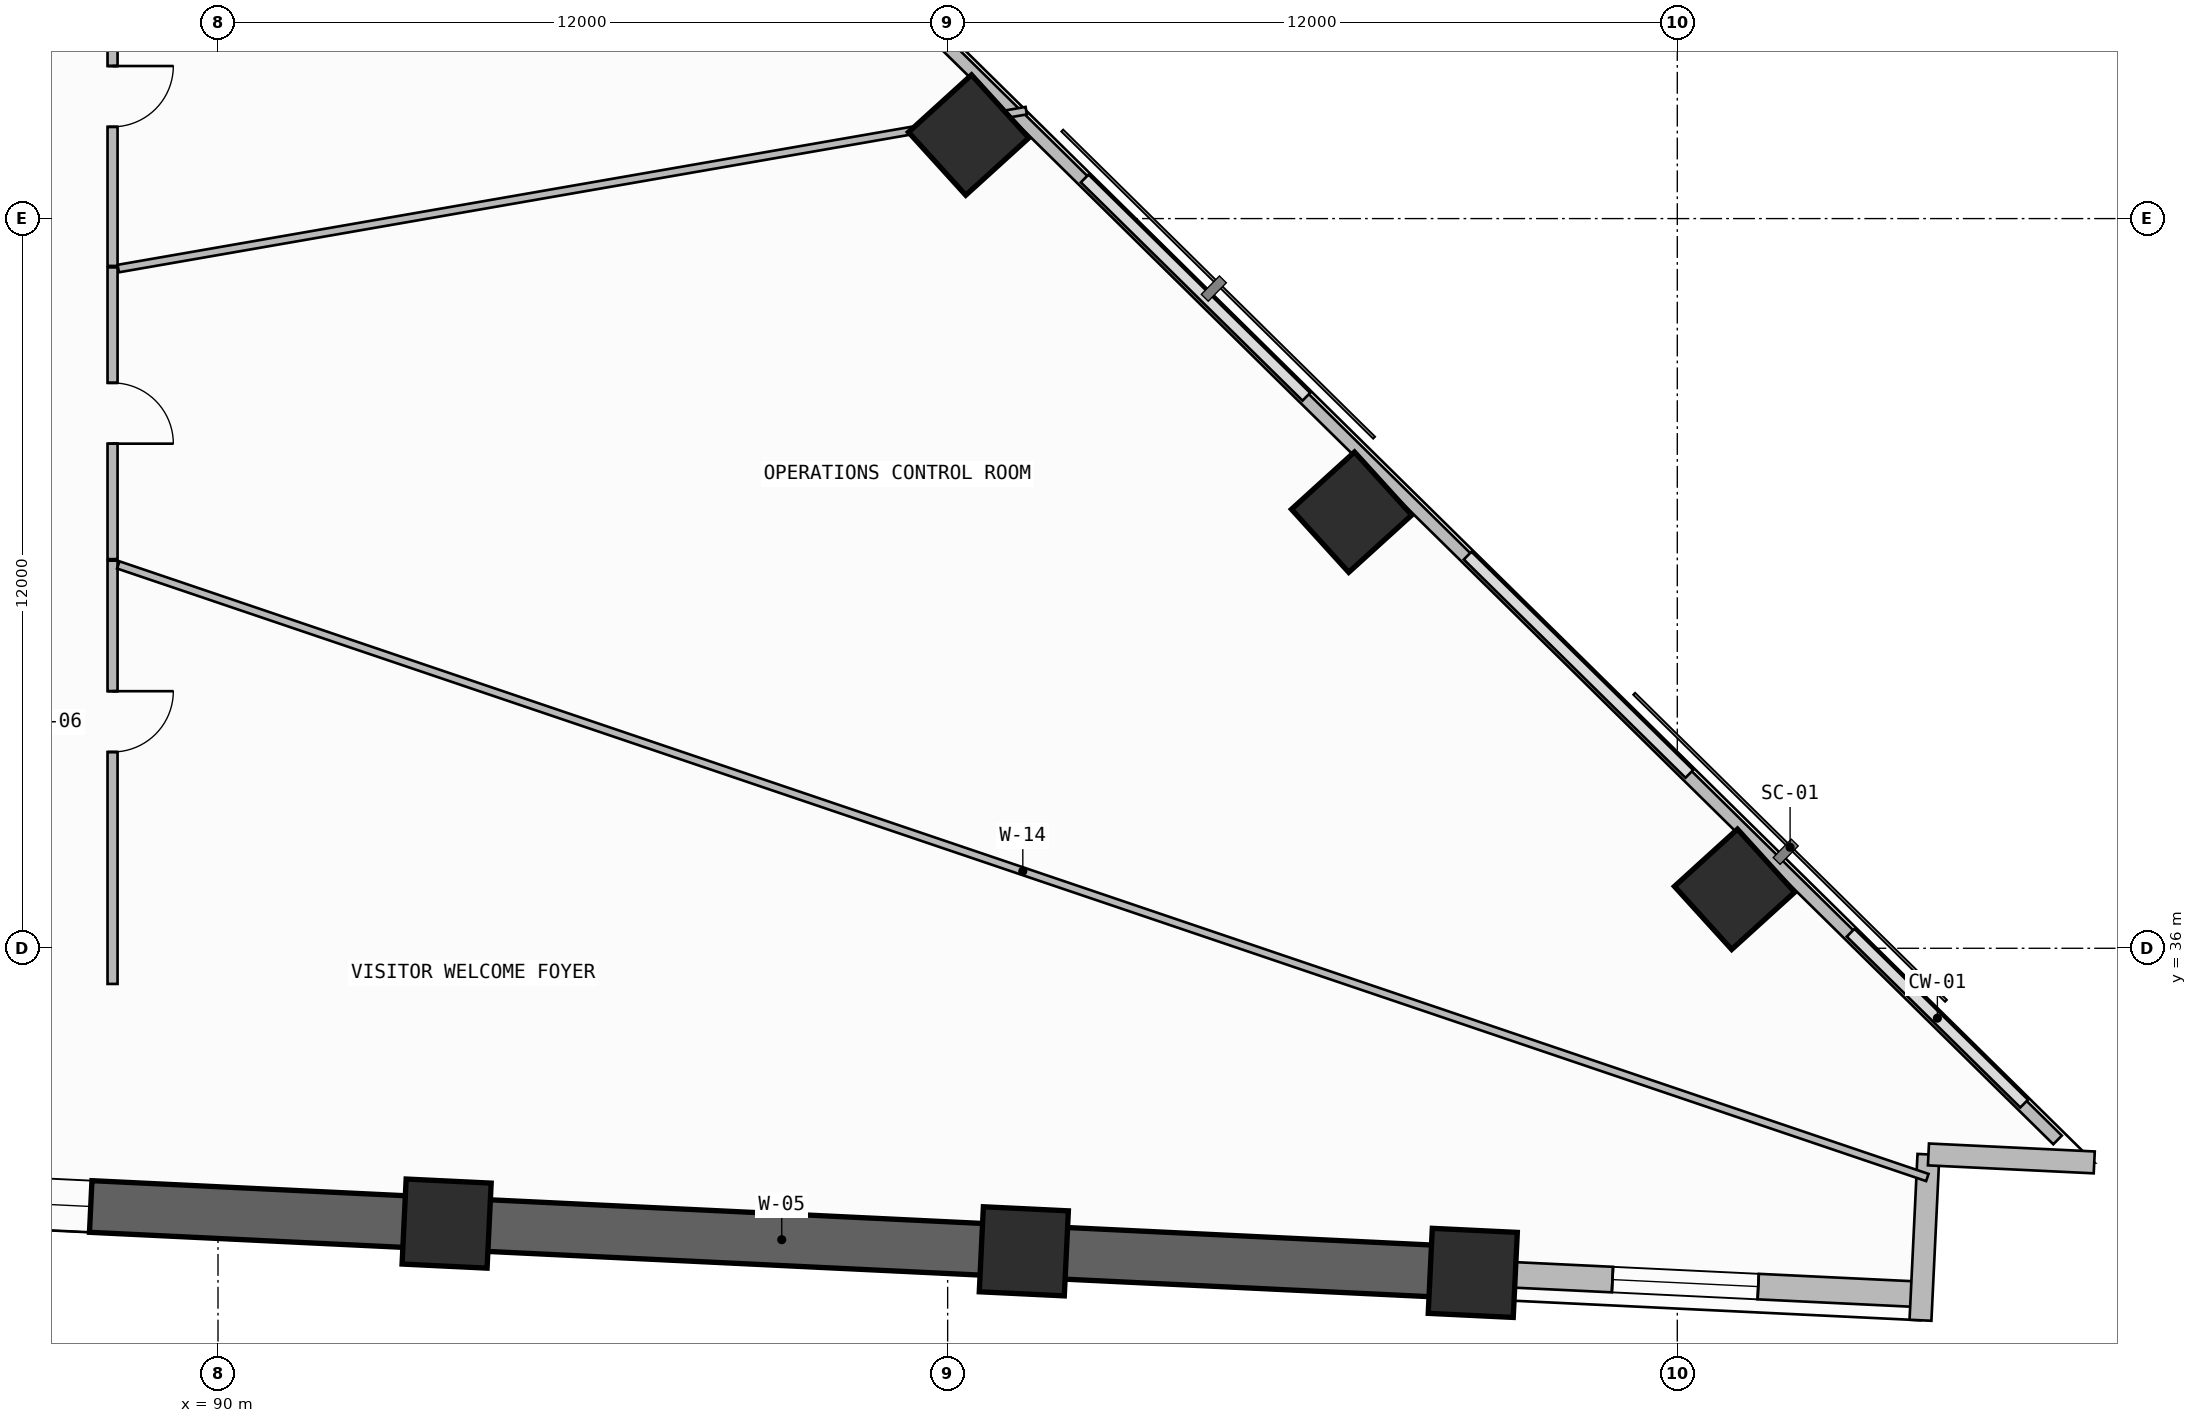
"""IFC4 building model, lengths in metres.
Left out: names, types, materials, properties, quantities, classifications, styles, units other than length and angle.
Written with IfcOpenShell. Run it as: python <this file> out.ifc"""

import sys

from ifc_helpers import new_model, si_unit, direction, frame, frame_2d, origin, origin_2d, place, context, subcontext, project, spatial, rectangle, extrude, element, fill, save


model = new_model("IFC4")
c1 = context("Model", 3, precision=1e-05, world=origin(), true_north=direction((0.0, 1.0)))
c2 = subcontext(c1, "Body", "Model", "MODEL_VIEW")
j1 = project(units=[si_unit("LENGTHUNIT", "METRE"), si_unit("PLANEANGLEUNIT", "RADIAN")], contexts=[c1])
p1 = place(None, origin())
s1 = spatial("IfcSite", under=j1, at=p1, CompositionType="ELEMENT")
p2 = place(p1, origin())
s2 = spatial("IfcBuilding", under=s1, at=p2, CompositionType="ELEMENT")
p3 = place(p2, frame((0.0, 0.0, 55.5)))
s3 = spatial("IfcBuildingStorey", under=s2, at=p3, CompositionType="ELEMENT", Elevation=55.5)
for number, where, z_axis, x_axis in (
    (1, (93.76, 31.472, 0.0), (0.0, 0.0, 1.0), (-0.999, 0.048, 0.0)),
    (2, (103.253, 31.017, 0.0), (0.0, 0.0, 1.0), (-0.999, 0.048, 0.0)),
    (3, (110.636, 30.662, 0.0), (0.0, 0.0, 1.0), (-0.999, 0.048, 0.0)),
    (4, (114.942, 36.97, 0.0), (0.0, 0.0, 1.0), (0.74, 0.672, 0.0)),
    (5, (108.644, 43.172, 0.0), (0.0, 0.0, 1.0), (0.74, 0.672, 0.0)),
    (6, (102.345, 49.374, 0.0), (0.0, 0.0, 1.0), (0.74, 0.672, 0.0)),
):
    element("IfcColumn", number, at=place(p3, frame(where, z_axis=z_axis, x_axis=x_axis)), inside=s3, PredefinedType="COLUMN", context=c2, shape_type="SweptSolid", body=[
        extrude(rectangle(XDim=1.4, YDim=1.4, at=origin_2d()), origin(), (0.0, 0.0, 1.0), 3.6),
    ])
p4 = place(p3, frame((83.212, 31.979, -0.2), z_axis=(0.0, 0.0, 1.0), x_axis=(0.998848235141, -0.047981279227, 0.0)))
e7 = element("IfcWall", 7, at=p4, inside=s3, PredefinedType="SHEAR", context=c2, shape_type="SweptSolid", body=[
    extrude(rectangle(XDim=27.456, YDim=0.85, at=frame_2d((13.728, 0.0))), origin(), (0.0, 0.0, 1.0), 3.3),
])
p5 = place(p4, frame((2.3, 0.0, 1.2)))
e8 = element("IfcOpeningElement", 8, at=p5, cuts=e7, PredefinedType="OPENING", context=c2, shape_type="SweptSolid", body=[
    extrude(rectangle(XDim=2.4, YDim=0.9, at=frame_2d((1.2, 0.45))), frame((0.0, 0.435, 0.0), z_axis=(0.0, -1.0, 0.0), x_axis=(1.0, 0.0, 0.0)), (0.0, 0.0, 1.0), 0.87),
])
p6 = place(p3, frame((110.636, 30.662, 0.0), z_axis=(0.0, 0.0, 1.0), x_axis=(0.998847872759, -0.047988822508, 0.0)))
e9 = element("IfcWall", 9, at=p6, inside=s3, PredefinedType="SOLIDWALL", context=c2, shape_type="SweptSolid", body=[
    extrude(rectangle(XDim=7.392, YDim=0.42, at=frame_2d((3.696, 0.0))), origin(), (0.0, 0.0, 1.0), 2.485),
])
p7 = place(p6, frame((2.3, 0.0, 1.2)))
e10 = element("IfcOpeningElement", 10, at=p7, cuts=e9, PredefinedType="OPENING", context=c2, shape_type="SweptSolid", body=[
    extrude(rectangle(XDim=2.4, YDim=0.9, at=frame_2d((1.2, 0.45))), frame((0.0, 0.22, 0.0), z_axis=(0.0, -1.0, 0.0), x_axis=(1.0, 0.0, 0.0)), (0.0, 0.0, 1.0), 0.44),
])
for number, where, z_axis, x_axis in (
    (11, (118.0, 29.883, 0.0), (0.0, 0.0, 1.0), (0.048, 0.999, 0.0)),
    (12, (118.131, 32.61, 0.0), (0.0, 0.0, 1.0), (0.999, -0.048, 0.0)),
):
    element("IfcWall", number, at=place(p3, frame(where, z_axis=z_axis, x_axis=x_axis)), inside=s3, PredefinedType="SOLIDWALL", context=c2, shape_type="SweptSolid", body=[
        extrude(rectangle(XDim=2.73, YDim=0.36, at=frame_2d((1.365, 0.0))), origin(), (0.0, 0.0, 1.0), 3.1),
    ])
p8 = place(p3, frame((120.254, 32.848, 0.0), z_axis=(0.0, 0.0, 1.0), x_axis=(-0.71254385441, 0.701627576099, 0.0)))
e13 = element("IfcWall", 13, at=p8, inside=s3, PredefinedType="PARAPET", context=c2, shape_type="SweptSolid", body=[
    extrude(rectangle(XDim=36.142, YDim=0.2, at=frame_2d((18.071, 0.0))), origin(), (0.0, 0.0, 1.0), 1.15),
])
p9 = place(p3, frame((88.266, 35.414, 0.0), z_axis=(0.0, 0.0, 1.0), x_axis=(0.0, 1.0, 0.0)))
e14 = element("IfcWall", 14, at=p9, inside=s3, PredefinedType="PARTITIONING", context=c2, shape_type="SweptSolid", body=[
    extrude(rectangle(XDim=6.961, YDim=0.165, at=frame_2d((3.48, 0.0))), origin(), (0.0, 0.0, 1.0), 3.1),
])
p10 = place(p9, frame((3.814, 0.0, 0.0)))
e15 = element("IfcOpeningElement", 15, at=p10, cuts=e14, PredefinedType="OPENING", context=c2, shape_type="SweptSolid", body=[
    extrude(rectangle(XDim=1.0, YDim=2.2, at=frame_2d((0.5, 1.1))), frame((0.0, 0.093, 0.0), z_axis=(0.0, -1.0, 0.0), x_axis=(1.0, 0.0, 0.0)), (0.0, 0.0, 1.0), 0.185),
])
p11 = place(p3, frame((88.36, 42.304, 0.0), z_axis=(0.0, 0.0, 1.0), x_axis=(0.947179651732, -0.32070345702, 0.0)))
e16 = element("IfcWall", 16, at=p11, inside=s3, PredefinedType="PARTITIONING", context=c2, shape_type="SweptSolid", body=[
    extrude(rectangle(XDim=31.411, YDim=0.125, at=frame_2d((15.706, 0.0))), origin(), (0.0, 0.0, 1.0), 2.485),
])
p12 = place(p3, frame((88.266, 42.399, 0.0), z_axis=(0.0, 0.0, 1.0), x_axis=(0.0, 1.0, 0.0)))
e17 = element("IfcWall", 17, at=p12, inside=s3, PredefinedType="PARTITIONING", context=c2, shape_type="SweptSolid", body=[
    extrude(rectangle(XDim=4.798, YDim=0.165, at=frame_2d((2.399, 0.0))), origin(), (0.0, 0.0, 1.0), 2.485),
])
p13 = place(p12, frame((1.899, 0.0, 0.0)))
e18 = element("IfcOpeningElement", 18, at=p13, cuts=e17, PredefinedType="OPENING", context=c2, shape_type="SweptSolid", body=[
    extrude(rectangle(XDim=1.0, YDim=2.2, at=frame_2d((0.5, 1.1))), frame((0.0, 0.093, 0.0), z_axis=(0.0, -1.0, 0.0), x_axis=(1.0, 0.0, 0.0)), (0.0, 0.0, 1.0), 0.185),
])
p14 = place(p3, frame((88.36, 47.178, 0.0), z_axis=(0.0, 0.0, 1.0), x_axis=(0.985210927216, 0.171345933402, 0.0)))
e19 = element("IfcWall", 19, at=p14, inside=s3, PredefinedType="PARTITIONING", context=c2, shape_type="SweptSolid", body=[
    extrude(rectangle(XDim=15.156, YDim=0.125, at=frame_2d((7.578, 0.0))), origin(), (0.0, 0.0, 1.0), 2.485),
])
p15 = place(p3, frame((88.266, 47.222, 0.0), z_axis=(0.0, 0.0, 1.0), x_axis=(0.0, 1.0, 0.0)))
e20 = element("IfcWall", 20, at=p15, inside=s3, PredefinedType="PARTITIONING", context=c2, shape_type="SweptSolid", body=[
    extrude(rectangle(XDim=5.574, YDim=0.165, at=frame_2d((2.787, 0.0))), origin(), (0.0, 0.0, 1.0), 3.1),
])
p16 = place(p15, frame((2.287, 0.0, 0.0)))
e21 = element("IfcOpeningElement", 21, at=p16, cuts=e20, PredefinedType="OPENING", context=c2, shape_type="SweptSolid", body=[
    extrude(rectangle(XDim=1.0, YDim=2.2, at=frame_2d((0.5, 1.1))), frame((0.0, 0.093, 0.0), z_axis=(0.0, -1.0, 0.0), x_axis=(1.0, 0.0, 0.0)), (0.0, 0.0, 1.0), 0.185),
])
p17 = place(p5, origin())
e22 = element("IfcWindow", 22, at=p17, inside=s3, PartitioningType="SINGLE_PANEL", PredefinedType="WINDOW", context=c2, shape_type="SweptSolid", body=[
    extrude(rectangle(XDim=2.4, YDim=0.9, at=frame_2d((1.2, 0.45))), frame((0.0, 0.03, 0.0), z_axis=(0.0, -1.0, 0.0), x_axis=(1.0, 0.0, 0.0)), (0.0, 0.0, 1.0), 0.06),
])
fill(e8, e22)
p18 = place(p7, origin())
e23 = element("IfcWindow", 23, at=p18, inside=s3, PartitioningType="SINGLE_PANEL", PredefinedType="WINDOW", context=c2, shape_type="SweptSolid", body=[
    extrude(rectangle(XDim=2.4, YDim=0.9, at=frame_2d((1.2, 0.45))), frame((0.0, 0.03, 0.0), z_axis=(0.0, -1.0, 0.0), x_axis=(1.0, 0.0, 0.0)), (0.0, 0.0, 1.0), 0.06),
])
fill(e10, e23)
p19 = place(p10, frame((1.0, 0.0, 0.0), z_axis=(0.0, 0.0, 1.0), x_axis=(-1.0, 0.0, 0.0)))
e24 = element("IfcDoor", 24, at=p19, inside=s3, OperationType="SINGLE_SWING_LEFT", PredefinedType="DOOR", context=c2, shape_type="SweptSolid", body=[
    extrude(rectangle(XDim=1.0, YDim=2.2, at=frame_2d((0.5, 1.1))), frame((0.0, 0.025, 0.0), z_axis=(0.0, -1.0, 0.0), x_axis=(1.0, 0.0, 0.0)), (0.0, 0.0, 1.0), 0.05),
])
fill(e15, e24)
p20 = place(p13, frame((1.0, 0.0, 0.0), z_axis=(0.0, 0.0, 1.0), x_axis=(-1.0, 0.0, 0.0)))
e25 = element("IfcDoor", 25, at=p20, inside=s3, OperationType="SINGLE_SWING_RIGHT", PredefinedType="DOOR", context=c2, shape_type="SweptSolid", body=[
    extrude(rectangle(XDim=1.0, YDim=2.2, at=frame_2d((0.5, 1.1))), frame((0.0, 0.025, 0.0), z_axis=(0.0, -1.0, 0.0), x_axis=(1.0, 0.0, 0.0)), (0.0, 0.0, 1.0), 0.05),
])
fill(e18, e25)
p21 = place(p16, frame((1.0, 0.0, 0.0), z_axis=(0.0, 0.0, 1.0), x_axis=(-1.0, 0.0, 0.0)))
e26 = element("IfcDoor", 26, at=p21, inside=s3, OperationType="SINGLE_SWING_LEFT", PredefinedType="DOOR", context=c2, shape_type="SweptSolid", body=[
    extrude(rectangle(XDim=1.0, YDim=2.2, at=frame_2d((0.5, 1.1))), frame((0.0, 0.025, 0.0), z_axis=(0.0, -1.0, 0.0), x_axis=(1.0, 0.0, 0.0)), (0.0, 0.0, 1.0), 0.05),
])
fill(e21, e26)
save(model, sys.argv[1])
